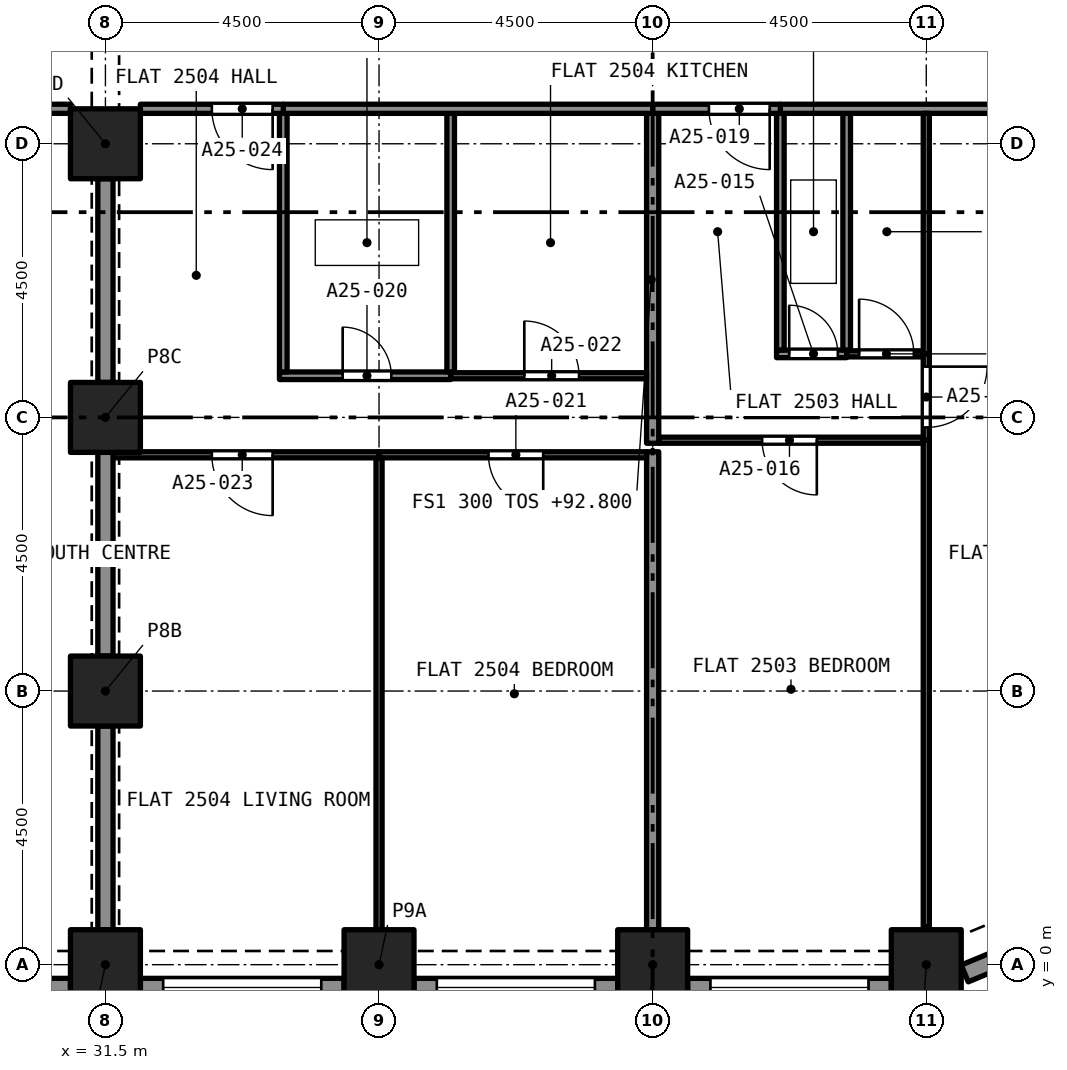
"""IFC4 building model, lengths in metres.
Left out: names, types, materials, properties, quantities, classifications, styles, units other than length and angle.
Written with IfcOpenShell. Run it as: python <this file> out.ifc"""

import sys

from ifc_helpers import new_model, si_unit, direction, frame, frame_2d, origin, origin_2d, place, context, subcontext, project, spatial, rectangle, extrude, element, fill, save


model = new_model("IFC4")
c1 = context("Model", 3, precision=1e-05, world=origin(), true_north=direction((0.0, 1.0)))
c2 = subcontext(c1, "Body", "Model", "MODEL_VIEW")
j1 = project(units=[si_unit("LENGTHUNIT", "METRE"), si_unit("PLANEANGLEUNIT", "RADIAN")], contexts=[c1])
p1 = place(None, origin())
s1 = spatial("IfcSite", under=j1, at=p1, CompositionType="ELEMENT")
p2 = place(p1, origin())
s2 = spatial("IfcBuilding", under=s1, at=p2, CompositionType="ELEMENT")
p3 = place(p2, frame((0.0, 0.0, 92.8)))
s3 = spatial("IfcBuildingStorey", under=s2, at=p3, CompositionType="ELEMENT", Elevation=92.8)
for number, where, z_axis, x_axis in (
    (1, (31.5, 0.0, 0.0), (0.0, 0.0, 1.0), (1.0, 0.0, 0.0)),
    (2, (36.0, 0.0, 0.0), (0.0, 0.0, 1.0), (1.0, 0.0, 0.0)),
    (3, (40.5, 0.0, 0.0), (0.0, 0.0, 1.0), (1.0, 0.0, 0.0)),
    (4, (45.0, 0.0, 0.0), (0.0, 0.0, 1.0), (1.0, 0.0, 0.0)),
    (5, (31.5, 4.5, 0.0), (0.0, 0.0, 1.0), (1.0, 0.0, 0.0)),
    (6, (31.5, 9.0, 0.0), (0.0, 0.0, 1.0), (1.0, 0.0, 0.0)),
    (7, (31.5, 13.5, 0.0), (0.0, 0.0, 1.0), (1.0, 0.0, 0.0)),
):
    element("IfcColumn", number, at=place(p3, frame(where, z_axis=z_axis, x_axis=x_axis)), inside=s3, PredefinedType="COLUMN", context=c2, shape_type="SweptSolid", body=[
        extrude(rectangle(XDim=1.15, YDim=1.15, at=origin_2d()), origin(), (0.0, 0.0, 1.0), 3.2),
    ])
p4 = place(p3, frame((30.925, -0.375, 0.0), z_axis=(0.0, 0.0, 1.0), x_axis=(-1.0, 0.0, 0.0)))
e8 = element("IfcWall", 8, at=p4, inside=s3, PredefinedType="SOLIDWALL", context=c2, shape_type="SweptSolid", body=[
    extrude(rectangle(XDim=3.35, YDim=0.3, at=frame_2d((1.675, 0.0))), origin(), (0.0, 0.0, 1.0), 3.2),
])
p5 = place(p4, frame((0.375, 0.0, 0.45)))
e9 = element("IfcOpeningElement", 9, at=p5, cuts=e8, PredefinedType="OPENING", context=c2, shape_type="SweptSolid", body=[
    extrude(rectangle(XDim=2.6, YDim=1.95, at=frame_2d((1.3, 0.975))), frame((0.0, 0.16, 0.0), z_axis=(0.0, -1.0, 0.0), x_axis=(1.0, 0.0, 0.0)), (0.0, 0.0, 1.0), 0.32),
])
p6 = place(p3, frame((35.425, -0.375, 0.0), z_axis=(0.0, 0.0, 1.0), x_axis=(-1.0, 0.0, 0.0)))
e10 = element("IfcWall", 10, at=p6, inside=s3, PredefinedType="SOLIDWALL", context=c2, shape_type="SweptSolid", body=[
    extrude(rectangle(XDim=3.35, YDim=0.3, at=frame_2d((1.675, 0.0))), origin(), (0.0, 0.0, 1.0), 3.2),
])
p7 = place(p6, frame((0.375, 0.0, 0.45)))
e11 = element("IfcOpeningElement", 11, at=p7, cuts=e10, PredefinedType="OPENING", context=c2, shape_type="SweptSolid", body=[
    extrude(rectangle(XDim=2.6, YDim=1.95, at=frame_2d((1.3, 0.975))), frame((0.0, 0.16, 0.0), z_axis=(0.0, -1.0, 0.0), x_axis=(1.0, 0.0, 0.0)), (0.0, 0.0, 1.0), 0.32),
])
p8 = place(p3, frame((39.925, -0.375, 0.0), z_axis=(0.0, 0.0, 1.0), x_axis=(-1.0, 0.0, 0.0)))
e12 = element("IfcWall", 12, at=p8, inside=s3, PredefinedType="SOLIDWALL", context=c2, shape_type="SweptSolid", body=[
    extrude(rectangle(XDim=3.35, YDim=0.3, at=frame_2d((1.675, 0.0))), origin(), (0.0, 0.0, 1.0), 3.2),
])
p9 = place(p8, frame((0.375, 0.0, 0.45)))
e13 = element("IfcOpeningElement", 13, at=p9, cuts=e12, PredefinedType="OPENING", context=c2, shape_type="SweptSolid", body=[
    extrude(rectangle(XDim=2.6, YDim=1.95, at=frame_2d((1.3, 0.975))), frame((0.0, 0.16, 0.0), z_axis=(0.0, -1.0, 0.0), x_axis=(1.0, 0.0, 0.0)), (0.0, 0.0, 1.0), 0.32),
])
p10 = place(p3, frame((44.425, -0.375, 0.0), z_axis=(0.0, 0.0, 1.0), x_axis=(-1.0, 0.0, 0.0)))
e14 = element("IfcWall", 14, at=p10, inside=s3, PredefinedType="SOLIDWALL", context=c2, shape_type="SweptSolid", body=[
    extrude(rectangle(XDim=3.35, YDim=0.3, at=frame_2d((1.675, 0.0))), origin(), (0.0, 0.0, 1.0), 3.2),
])
p11 = place(p10, frame((0.375, 0.0, 0.45)))
e15 = element("IfcOpeningElement", 15, at=p11, cuts=e14, PredefinedType="OPENING", context=c2, shape_type="SweptSolid", body=[
    extrude(rectangle(XDim=2.6, YDim=1.95, at=frame_2d((1.3, 0.975))), frame((0.0, 0.16, 0.0), z_axis=(0.0, -1.0, 0.0), x_axis=(1.0, 0.0, 0.0)), (0.0, 0.0, 1.0), 0.32),
])
p12 = place(p3, frame((47.631, 0.684, 0.0), z_axis=(0.0, 0.0, 1.0), x_axis=(-0.923862802911, -0.382723818695, 0.0)))
e16 = element("IfcWall", 16, at=p12, inside=s3, PredefinedType="SOLIDWALL", context=c2, shape_type="SweptSolid", body=[
    extrude(rectangle(XDim=2.164, YDim=0.3, at=frame_2d((1.082, 0.0))), origin(), (0.0, 0.0, 1.0), 3.2),
])
p13 = place(p12, frame((0.271, 0.0, 0.45)))
e17 = element("IfcOpeningElement", 17, at=p13, cuts=e16, PredefinedType="OPENING", context=c2, shape_type="SweptSolid", body=[
    extrude(rectangle(XDim=1.4, YDim=1.95, at=frame_2d((0.7, 0.975))), frame((0.0, 0.16, 0.0), z_axis=(0.0, -1.0, 0.0), x_axis=(1.0, 0.0, 0.0)), (0.0, 0.0, 1.0), 0.32),
])
p14 = place(p3, frame((42.538, 10.045, 0.0), z_axis=(0.0, 0.0, 1.0), x_axis=(1.0, 0.0, 0.0)))
e18 = element("IfcWall", 18, at=p14, inside=s3, PredefinedType="PARTITIONING", context=c2, shape_type="SweptSolid", body=[
    extrude(rectangle(XDim=1.153, YDim=0.125, at=frame_2d((0.577, 0.0))), origin(), (0.0, 0.0, 1.0), 2.9),
])
p15 = place(p14, frame((0.208, 0.0, 0.0)))
e19 = element("IfcOpeningElement", 19, at=p15, cuts=e18, PredefinedType="OPENING", context=c2, shape_type="SweptSolid", body=[
    extrude(rectangle(XDim=0.8, YDim=2.1, at=frame_2d((0.4, 1.05))), frame((0.0, 0.073, 0.0), z_axis=(0.0, -1.0, 0.0), x_axis=(1.0, 0.0, 0.0)), (0.0, 0.0, 1.0), 0.145),
])
for number, where, z_axis, x_axis in (
    (20, (42.6, 10.107, 0.0), (0.0, 0.0, 1.0), (0.0, 1.0, 0.0)),
    (21, (43.691, 10.107, 0.0), (0.0, 0.0, 1.0), (0.0, 1.0, 0.0)),
):
    element("IfcWall", number, at=place(p3, frame(where, z_axis=z_axis, x_axis=x_axis)), inside=s3, PredefinedType="PARTITIONING", context=c2, shape_type="SweptSolid", body=[
        extrude(rectangle(XDim=3.893, YDim=0.125, at=frame_2d((1.946, 0.0))), origin(), (0.0, 0.0, 1.0), 2.9),
    ])
p16 = place(p3, frame((42.6, 14.075, 0.0), z_axis=(0.0, 0.0, 1.0), x_axis=(1.0, 0.0, 0.0)))
e22 = element("IfcWall", 22, at=p16, inside=s3, PredefinedType="PARTITIONING", context=c2, shape_type="SweptSolid", body=[
    extrude(rectangle(XDim=6.325, YDim=0.15, at=frame_2d((3.163, 0.0))), origin(), (0.0, 0.0, 1.0), 2.9),
])
p17 = place(p3, frame((44.95, 8.625, 0.0), z_axis=(0.0, 0.0, 1.0), x_axis=(-1.0, 0.0, 0.0)))
e23 = element("IfcWall", 23, at=p17, inside=s3, PredefinedType="PARTITIONING", context=c2, shape_type="SweptSolid", body=[
    extrude(rectangle(XDim=4.35, YDim=0.1, at=frame_2d((2.175, 0.0))), origin(), (0.0, 0.0, 1.0), 2.9),
])
p18 = place(p17, frame((1.75, 0.0, 0.0)))
e24 = element("IfcOpeningElement", 24, at=p18, cuts=e23, PredefinedType="OPENING", context=c2, shape_type="SweptSolid", body=[
    extrude(rectangle(XDim=0.9, YDim=2.1, at=frame_2d((0.45, 1.05))), frame((0.0, 0.06, 0.0), z_axis=(0.0, -1.0, 0.0), x_axis=(1.0, 0.0, 0.0)), (0.0, 0.0, 1.0), 0.12),
])
p19 = place(p3, frame((45.0, 0.622, 0.0), z_axis=(0.0, 0.0, 1.0), x_axis=(0.0, 1.0, 0.0)))
e25 = element("IfcWall", 25, at=p19, inside=s3, PredefinedType="PARTITIONING", context=c2, shape_type="SweptSolid", body=[
    extrude(rectangle(XDim=8.003, YDim=0.1, at=frame_2d((4.001, 0.0))), origin(), (0.0, 0.0, 1.0), 2.9),
])
p20 = place(p3, frame((40.5, 0.575, 0.0), z_axis=(0.0, 0.0, 1.0), x_axis=(0.0, 1.0, 0.0)))
e26 = element("IfcWall", 26, at=p20, inside=s3, PredefinedType="PARTITIONING", context=c2, shape_type="SweptSolid", body=[
    extrude(rectangle(XDim=7.86, YDim=0.2, at=frame_2d((3.93, 0.0))), origin(), (0.0, 0.0, 1.0), 2.9),
])
p21 = place(p3, frame((43.691, 10.045, 0.0), z_axis=(0.0, 0.0, 1.0), x_axis=(1.0, 0.0, 0.0)))
e27 = element("IfcWall", 27, at=p21, inside=s3, PredefinedType="PARTITIONING", context=c2, shape_type="SweptSolid", body=[
    extrude(rectangle(XDim=1.259, YDim=0.1, at=frame_2d((0.629, 0.0))), origin(), (0.0, 0.0, 1.0), 2.9),
])
p22 = place(p21, frame((0.205, 0.0, 0.0)))
e28 = element("IfcOpeningElement", 28, at=p22, cuts=e27, PredefinedType="OPENING", context=c2, shape_type="SweptSolid", body=[
    extrude(rectangle(XDim=0.9, YDim=2.1, at=frame_2d((0.45, 1.05))), frame((0.0, 0.06, 0.0), z_axis=(0.0, -1.0, 0.0), x_axis=(1.0, 0.0, 0.0)), (0.0, 0.0, 1.0), 0.12),
])
p23 = place(p3, frame((45.0, 10.045, 0.0), z_axis=(0.0, 0.0, 1.0), x_axis=(0.0, -1.0, 0.0)))
e29 = element("IfcWall", 29, at=p23, inside=s3, PredefinedType="PARTITIONING", context=c2, shape_type="SweptSolid", body=[
    extrude(rectangle(XDim=1.42, YDim=0.1, at=frame_2d((0.71, 0.0))), origin(), (0.0, 0.0, 1.0), 2.9),
])
p24 = place(p23, frame((0.21, 0.0, 0.0)))
e30 = element("IfcOpeningElement", 30, at=p24, cuts=e29, PredefinedType="OPENING", context=c2, shape_type="SweptSolid", body=[
    extrude(rectangle(XDim=1.0, YDim=2.1, at=frame_2d((0.5, 1.05))), frame((0.0, 0.06, 0.0), z_axis=(0.0, -1.0, 0.0), x_axis=(1.0, 0.0, 0.0)), (0.0, 0.0, 1.0), 0.12),
])
p25 = place(p3, frame((40.5, 8.575, 0.0), z_axis=(0.0, 0.0, 1.0), x_axis=(0.0, 1.0, 0.0)))
e31 = element("IfcWall", 31, at=p25, inside=s3, PredefinedType="PARTITIONING", context=c2, shape_type="SweptSolid", body=[
    extrude(rectangle(XDim=5.425, YDim=0.2, at=frame_2d((2.712, 0.0))), origin(), (0.0, 0.0, 1.0), 2.9),
])
p26 = place(p3, frame((42.6, 14.075, 0.0), z_axis=(0.0, 0.0, 1.0), x_axis=(-1.0, 0.0, 0.0)))
e32 = element("IfcWall", 32, at=p26, inside=s3, PredefinedType="PARTITIONING", context=c2, shape_type="SweptSolid", body=[
    extrude(rectangle(XDim=2.1, YDim=0.15, at=frame_2d((1.05, 0.0))), origin(), (0.0, 0.0, 1.0), 2.9),
])
p27 = place(p26, frame((0.175, 0.0, 0.0)))
e33 = element("IfcOpeningElement", 33, at=p27, cuts=e32, PredefinedType="OPENING", context=c2, shape_type="SweptSolid", body=[
    extrude(rectangle(XDim=1.0, YDim=2.1, at=frame_2d((0.5, 1.05))), frame((0.0, 0.085, 0.0), z_axis=(0.0, -1.0, 0.0), x_axis=(1.0, 0.0, 0.0)), (0.0, 0.0, 1.0), 0.17),
])
p28 = place(p3, frame((45.0, 10.045, 0.0), z_axis=(0.0, 0.0, 1.0), x_axis=(0.0, 1.0, 0.0)))
e34 = element("IfcWall", 34, at=p28, inside=s3, PredefinedType="PARTITIONING", context=c2, shape_type="SweptSolid", body=[
    extrude(rectangle(XDim=3.955, YDim=0.1, at=frame_2d((1.978, 0.0))), origin(), (0.0, 0.0, 1.0), 2.9),
])
p29 = place(p3, frame((34.363, 9.685, 0.0), z_axis=(0.0, 0.0, 1.0), x_axis=(1.0, 0.0, 0.0)))
e35 = element("IfcWall", 35, at=p29, inside=s3, PredefinedType="PARTITIONING", context=c2, shape_type="SweptSolid", body=[
    extrude(rectangle(XDim=2.816, YDim=0.125, at=frame_2d((1.408, 0.0))), origin(), (0.0, 0.0, 1.0), 2.9),
])
p30 = place(p29, frame((1.039, 0.0, 0.0)))
e36 = element("IfcOpeningElement", 36, at=p30, cuts=e35, PredefinedType="OPENING", context=c2, shape_type="SweptSolid", body=[
    extrude(rectangle(XDim=0.8, YDim=2.1, at=frame_2d((0.4, 1.05))), frame((0.0, 0.073, 0.0), z_axis=(0.0, -1.0, 0.0), x_axis=(1.0, 0.0, 0.0)), (0.0, 0.0, 1.0), 0.145),
])
for number, where, z_axis, x_axis in (
    (37, (34.425, 9.748, 0.0), (0.0, 0.0, 1.0), (0.0, 1.0, 0.0)),
    (38, (37.178, 9.748, 0.0), (0.0, 0.0, 1.0), (0.0, 1.0, 0.0)),
):
    element("IfcWall", number, at=place(p3, frame(where, z_axis=z_axis, x_axis=x_axis)), inside=s3, PredefinedType="PARTITIONING", context=c2, shape_type="SweptSolid", body=[
        extrude(rectangle(XDim=4.252, YDim=0.125, at=frame_2d((2.126, 0.0))), origin(), (0.0, 0.0, 1.0), 2.9),
    ])
p31 = place(p3, frame((34.425, 14.075, 0.0), z_axis=(0.0, 0.0, 1.0), x_axis=(1.0, 0.0, 0.0)))
e39 = element("IfcWall", 39, at=p31, inside=s3, PredefinedType="PARTITIONING", context=c2, shape_type="SweptSolid", body=[
    extrude(rectangle(XDim=6.075, YDim=0.15, at=frame_2d((3.038, 0.0))), origin(), (0.0, 0.0, 1.0), 2.9),
])
p32 = place(p3, frame((40.4, 8.385, 0.0), z_axis=(0.0, 0.0, 1.0), x_axis=(-1.0, 0.0, 0.0)))
e40 = element("IfcWall", 40, at=p32, inside=s3, PredefinedType="PARTITIONING", context=c2, shape_type="SweptSolid", body=[
    extrude(rectangle(XDim=4.4, YDim=0.1, at=frame_2d((2.2, 0.0))), origin(), (0.0, 0.0, 1.0), 2.9),
])
p33 = place(p32, frame((1.7, 0.0, 0.0)))
e41 = element("IfcOpeningElement", 41, at=p33, cuts=e40, PredefinedType="OPENING", context=c2, shape_type="SweptSolid", body=[
    extrude(rectangle(XDim=0.9, YDim=2.1, at=frame_2d((0.45, 1.05))), frame((0.0, 0.06, 0.0), z_axis=(0.0, -1.0, 0.0), x_axis=(1.0, 0.0, 0.0)), (0.0, 0.0, 1.0), 0.12),
])
p34 = place(p3, frame((36.0, 0.575, 0.0), z_axis=(0.0, 0.0, 1.0), x_axis=(0.0, 1.0, 0.0)))
e42 = element("IfcWall", 42, at=p34, inside=s3, PredefinedType="PARTITIONING", context=c2, shape_type="SweptSolid", body=[
    extrude(rectangle(XDim=7.76, YDim=0.1, at=frame_2d((3.88, 0.0))), origin(), (0.0, 0.0, 1.0), 2.9),
])
p35 = place(p3, frame((37.178, 9.685, 0.0), z_axis=(0.0, 0.0, 1.0), x_axis=(1.0, 0.0, 0.0)))
e43 = element("IfcWall", 43, at=p35, inside=s3, PredefinedType="PARTITIONING", context=c2, shape_type="SweptSolid", body=[
    extrude(rectangle(XDim=3.222, YDim=0.1, at=frame_2d((1.611, 0.0))), origin(), (0.0, 0.0, 1.0), 2.9),
])
p36 = place(p35, frame((1.211, 0.0, 0.0)))
e44 = element("IfcOpeningElement", 44, at=p36, cuts=e43, PredefinedType="OPENING", context=c2, shape_type="SweptSolid", body=[
    extrude(rectangle(XDim=0.9, YDim=2.1, at=frame_2d((0.45, 1.05))), frame((0.0, 0.06, 0.0), z_axis=(0.0, -1.0, 0.0), x_axis=(1.0, 0.0, 0.0)), (0.0, 0.0, 1.0), 0.12),
])
p37 = place(p3, frame((36.0, 8.385, 0.0), z_axis=(0.0, 0.0, 1.0), x_axis=(-1.0, 0.0, 0.0)))
e45 = element("IfcWall", 45, at=p37, inside=s3, PredefinedType="PARTITIONING", context=c2, shape_type="SweptSolid", body=[
    extrude(rectangle(XDim=4.375, YDim=0.1, at=frame_2d((2.188, 0.0))), origin(), (0.0, 0.0, 1.0), 2.9),
])
p38 = place(p37, frame((1.75, 0.0, 0.0)))
e46 = element("IfcOpeningElement", 46, at=p38, cuts=e45, PredefinedType="OPENING", context=c2, shape_type="SweptSolid", body=[
    extrude(rectangle(XDim=1.0, YDim=2.1, at=frame_2d((0.5, 1.05))), frame((0.0, 0.06, 0.0), z_axis=(0.0, -1.0, 0.0), x_axis=(1.0, 0.0, 0.0)), (0.0, 0.0, 1.0), 0.12),
])
p39 = place(p3, frame((31.5, 9.575, 0.0), z_axis=(0.0, 0.0, 1.0), x_axis=(0.0, 1.0, 0.0)))
e47 = element("IfcWall", 47, at=p39, inside=s3, PredefinedType="PARTITIONING", context=c2, shape_type="SweptSolid", body=[
    extrude(rectangle(XDim=3.35, YDim=0.25, at=frame_2d((1.675, 0.0))), origin(), (0.0, 0.0, 1.0), 2.38),
])
p40 = place(p3, frame((34.425, 14.075, 0.0), z_axis=(0.0, 0.0, 1.0), x_axis=(-1.0, 0.0, 0.0)))
e48 = element("IfcWall", 48, at=p40, inside=s3, PredefinedType="PARTITIONING", context=c2, shape_type="SweptSolid", body=[
    extrude(rectangle(XDim=2.35, YDim=0.15, at=frame_2d((1.175, 0.0))), origin(), (0.0, 0.0, 1.0), 2.9),
])
p41 = place(p40, frame((0.175, 0.0, 0.0)))
e49 = element("IfcOpeningElement", 49, at=p41, cuts=e48, PredefinedType="OPENING", context=c2, shape_type="SweptSolid", body=[
    extrude(rectangle(XDim=1.0, YDim=2.1, at=frame_2d((0.5, 1.05))), frame((0.0, 0.085, 0.0), z_axis=(0.0, -1.0, 0.0), x_axis=(1.0, 0.0, 0.0)), (0.0, 0.0, 1.0), 0.17),
])
p42 = place(p3, frame((31.5, 0.575, 0.0), z_axis=(0.0, 0.0, 1.0), x_axis=(0.0, 1.0, 0.0)))
e50 = element("IfcWall", 50, at=p42, inside=s3, PredefinedType="PARTITIONING", context=c2, shape_type="SweptSolid", body=[
    extrude(rectangle(XDim=3.35, YDim=0.25, at=frame_2d((1.675, 0.0))), origin(), (0.0, 0.0, 1.0), 2.38),
])
p43 = place(p3, frame((31.5, 5.075, 0.0), z_axis=(0.0, 0.0, 1.0), x_axis=(0.0, 1.0, 0.0)))
e51 = element("IfcWall", 51, at=p43, inside=s3, PredefinedType="PARTITIONING", context=c2, shape_type="SweptSolid", body=[
    extrude(rectangle(XDim=3.36, YDim=0.25, at=frame_2d((1.68, 0.0))), origin(), (0.0, 0.0, 1.0), 2.38),
])
p44 = place(p3, frame((30.925, 14.075, 0.0), z_axis=(0.0, 0.0, 1.0), x_axis=(-1.0, 0.0, 0.0)))
e52 = element("IfcWall", 52, at=p44, inside=s3, PredefinedType="PARTITIONING", context=c2, shape_type="SweptSolid", body=[
    extrude(rectangle(XDim=3.925, YDim=0.15, at=frame_2d((1.962, 0.0))), origin(), (0.0, 0.0, 1.0), 2.75),
])
p45 = place(p44, frame((1.175, 0.0, 0.0)))
e53 = element("IfcOpeningElement", 53, at=p45, cuts=e52, PredefinedType="OPENING", context=c2, shape_type="SweptSolid", body=[
    extrude(rectangle(XDim=1.0, YDim=2.1, at=frame_2d((0.5, 1.05))), frame((0.0, 0.085, 0.0), z_axis=(0.0, -1.0, 0.0), x_axis=(1.0, 0.0, 0.0)), (0.0, 0.0, 1.0), 0.17),
])
p46 = place(p7, origin())
e54 = element("IfcWindow", 54, at=p46, inside=s3, PartitioningType="SINGLE_PANEL", PredefinedType="WINDOW", context=c2, shape_type="SweptSolid", body=[
    extrude(rectangle(XDim=2.6, YDim=1.95, at=frame_2d((1.3, 0.975))), frame((0.0, 0.03, 0.0), z_axis=(0.0, -1.0, 0.0), x_axis=(1.0, 0.0, 0.0)), (0.0, 0.0, 1.0), 0.06),
])
fill(e11, e54)
p47 = place(p9, origin())
e55 = element("IfcWindow", 55, at=p47, inside=s3, PartitioningType="SINGLE_PANEL", PredefinedType="WINDOW", context=c2, shape_type="SweptSolid", body=[
    extrude(rectangle(XDim=2.6, YDim=1.95, at=frame_2d((1.3, 0.975))), frame((0.0, 0.03, 0.0), z_axis=(0.0, -1.0, 0.0), x_axis=(1.0, 0.0, 0.0)), (0.0, 0.0, 1.0), 0.06),
])
fill(e13, e55)
p48 = place(p11, origin())
e56 = element("IfcWindow", 56, at=p48, inside=s3, PartitioningType="SINGLE_PANEL", PredefinedType="WINDOW", context=c2, shape_type="SweptSolid", body=[
    extrude(rectangle(XDim=2.6, YDim=1.95, at=frame_2d((1.3, 0.975))), frame((0.0, 0.03, 0.0), z_axis=(0.0, -1.0, 0.0), x_axis=(1.0, 0.0, 0.0)), (0.0, 0.0, 1.0), 0.06),
])
fill(e15, e56)
p49 = place(p15, origin())
e57 = element("IfcDoor", 57, at=p49, inside=s3, OperationType="SINGLE_SWING_RIGHT", PredefinedType="DOOR", context=c2, shape_type="SweptSolid", body=[
    extrude(rectangle(XDim=0.8, YDim=2.1, at=frame_2d((0.4, 1.05))), frame((0.0, 0.025, 0.0), z_axis=(0.0, -1.0, 0.0), x_axis=(1.0, 0.0, 0.0)), (0.0, 0.0, 1.0), 0.05),
])
fill(e19, e57)
p50 = place(p18, origin())
e58 = element("IfcDoor", 58, at=p50, inside=s3, OperationType="SINGLE_SWING_RIGHT", PredefinedType="DOOR", context=c2, shape_type="SweptSolid", body=[
    extrude(rectangle(XDim=0.9, YDim=2.1, at=frame_2d((0.45, 1.05))), frame((0.0, 0.025, 0.0), z_axis=(0.0, -1.0, 0.0), x_axis=(1.0, 0.0, 0.0)), (0.0, 0.0, 1.0), 0.05),
])
fill(e24, e58)
p51 = place(p22, origin())
e59 = element("IfcDoor", 59, at=p51, inside=s3, OperationType="SINGLE_SWING_RIGHT", PredefinedType="DOOR", context=c2, shape_type="SweptSolid", body=[
    extrude(rectangle(XDim=0.9, YDim=2.1, at=frame_2d((0.45, 1.05))), frame((0.0, 0.025, 0.0), z_axis=(0.0, -1.0, 0.0), x_axis=(1.0, 0.0, 0.0)), (0.0, 0.0, 1.0), 0.05),
])
fill(e28, e59)
p52 = place(p24, origin())
e60 = element("IfcDoor", 60, at=p52, inside=s3, OperationType="SINGLE_SWING_LEFT", PredefinedType="DOOR", context=c2, shape_type="SweptSolid", body=[
    extrude(rectangle(XDim=1.0, YDim=2.1, at=frame_2d((0.5, 1.05))), frame((0.0, 0.025, 0.0), z_axis=(0.0, -1.0, 0.0), x_axis=(1.0, 0.0, 0.0)), (0.0, 0.0, 1.0), 0.05),
])
fill(e30, e60)
p53 = place(p27, origin())
e61 = element("IfcDoor", 61, at=p53, inside=s3, OperationType="SINGLE_SWING_LEFT", PredefinedType="DOOR", context=c2, shape_type="SweptSolid", body=[
    extrude(rectangle(XDim=1.0, YDim=2.1, at=frame_2d((0.5, 1.05))), frame((0.0, 0.025, 0.0), z_axis=(0.0, -1.0, 0.0), x_axis=(1.0, 0.0, 0.0)), (0.0, 0.0, 1.0), 0.05),
])
fill(e33, e61)
p54 = place(p30, origin())
e62 = element("IfcDoor", 62, at=p54, inside=s3, OperationType="SINGLE_SWING_RIGHT", PredefinedType="DOOR", context=c2, shape_type="SweptSolid", body=[
    extrude(rectangle(XDim=0.8, YDim=2.1, at=frame_2d((0.4, 1.05))), frame((0.0, 0.025, 0.0), z_axis=(0.0, -1.0, 0.0), x_axis=(1.0, 0.0, 0.0)), (0.0, 0.0, 1.0), 0.05),
])
fill(e36, e62)
p55 = place(p33, origin())
e63 = element("IfcDoor", 63, at=p55, inside=s3, OperationType="SINGLE_SWING_LEFT", PredefinedType="DOOR", context=c2, shape_type="SweptSolid", body=[
    extrude(rectangle(XDim=0.9, YDim=2.1, at=frame_2d((0.45, 1.05))), frame((0.0, 0.025, 0.0), z_axis=(0.0, -1.0, 0.0), x_axis=(1.0, 0.0, 0.0)), (0.0, 0.0, 1.0), 0.05),
])
fill(e41, e63)
p56 = place(p36, origin())
e64 = element("IfcDoor", 64, at=p56, inside=s3, OperationType="SINGLE_SWING_RIGHT", PredefinedType="DOOR", context=c2, shape_type="SweptSolid", body=[
    extrude(rectangle(XDim=0.9, YDim=2.1, at=frame_2d((0.45, 1.05))), frame((0.0, 0.025, 0.0), z_axis=(0.0, -1.0, 0.0), x_axis=(1.0, 0.0, 0.0)), (0.0, 0.0, 1.0), 0.05),
])
fill(e44, e64)
p57 = place(p38, origin())
e65 = element("IfcDoor", 65, at=p57, inside=s3, OperationType="SINGLE_SWING_RIGHT", PredefinedType="DOOR", context=c2, shape_type="SweptSolid", body=[
    extrude(rectangle(XDim=1.0, YDim=2.1, at=frame_2d((0.5, 1.05))), frame((0.0, 0.025, 0.0), z_axis=(0.0, -1.0, 0.0), x_axis=(1.0, 0.0, 0.0)), (0.0, 0.0, 1.0), 0.05),
])
fill(e46, e65)
p58 = place(p41, origin())
e66 = element("IfcDoor", 66, at=p58, inside=s3, OperationType="SINGLE_SWING_LEFT", PredefinedType="DOOR", context=c2, shape_type="SweptSolid", body=[
    extrude(rectangle(XDim=1.0, YDim=2.1, at=frame_2d((0.5, 1.05))), frame((0.0, 0.025, 0.0), z_axis=(0.0, -1.0, 0.0), x_axis=(1.0, 0.0, 0.0)), (0.0, 0.0, 1.0), 0.05),
])
fill(e49, e66)
save(model, sys.argv[1])
